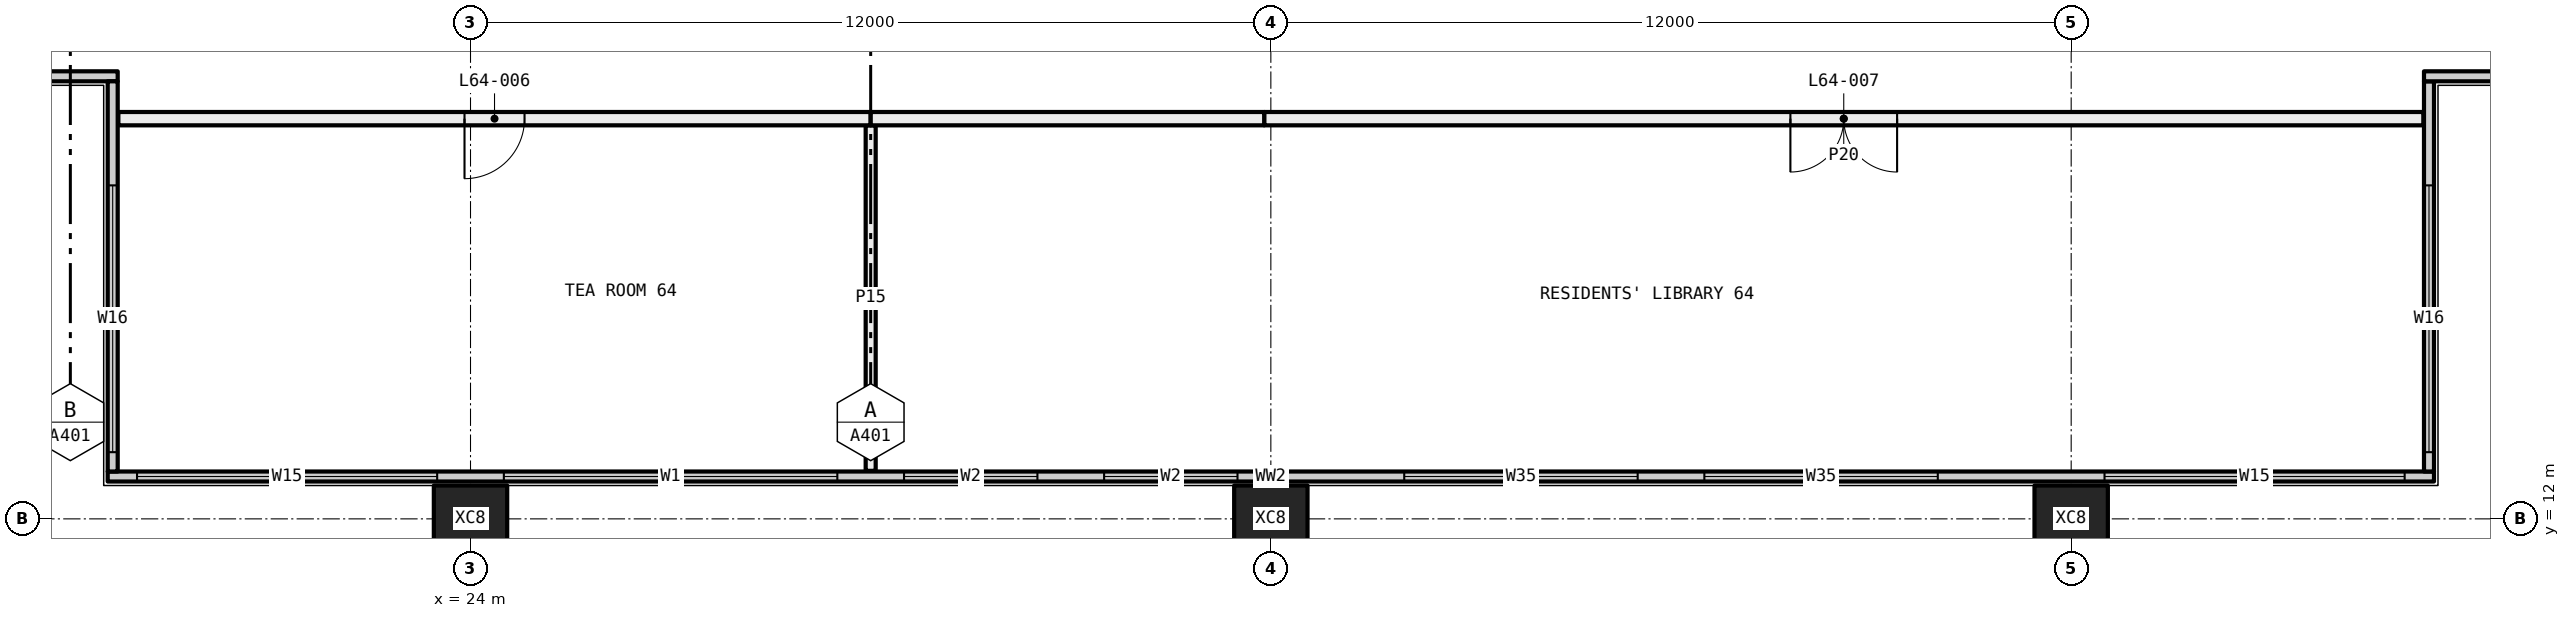
"""IFC4 building model, lengths in metres.
Left out: names, types, materials, properties, quantities, classifications, styles, units other than length and angle.
Written with IfcOpenShell. Run it as: python <this file> out.ifc"""

import sys

from ifc_helpers import new_model, si_unit, direction, frame, frame_2d, origin, origin_2d, place, context, subcontext, project, spatial, rectangle, hollow_rectangle, extrude, element, fill, save


model = new_model("IFC4")
c1 = context("Model", 3, precision=1e-05, world=origin(), true_north=direction((0.0, 1.0)))
c2 = subcontext(c1, "Body", "Model", "MODEL_VIEW")
j1 = project(units=[si_unit("LENGTHUNIT", "METRE"), si_unit("PLANEANGLEUNIT", "RADIAN")], contexts=[c1])
p1 = place(None, origin())
s1 = spatial("IfcSite", under=j1, at=p1, CompositionType="ELEMENT")
p2 = place(p1, origin())
s2 = spatial("IfcBuilding", under=s1, at=p2, CompositionType="ELEMENT")
p3 = place(p2, frame((0.0, 0.0, 238.65)))
s3 = spatial("IfcBuildingStorey", under=s2, at=p3, CompositionType="ELEMENT", Elevation=238.65)
for number, where, z_axis, x_axis in (
    (1, (24.0, 12.0, -0.4), (0.0, 0.0, 1.0), (1.0, 0.0, 0.0)),
    (2, (36.0, 12.0, -0.4), (0.0, 0.0, 1.0), (1.0, 0.0, 0.0)),
    (3, (48.0, 12.0, -0.4), (0.0, 0.0, 1.0), (1.0, 0.0, 0.0)),
):
    element("IfcColumn", number, at=place(p3, frame(where, z_axis=z_axis, x_axis=x_axis)), inside=s3, PredefinedType="COLUMN", context=c2, shape_type="SweptSolid", body=[
        extrude(hollow_rectangle(XDim=1.1, YDim=1.0, WallThickness=0.04, at=origin_2d()), origin(), (0.0, 0.0, 1.0), 3.45),
    ])
p4 = place(p3, frame((18.56, 12.635, 0.0), z_axis=(0.0, 0.0, 1.0), x_axis=(1.0, 0.0, 0.0)))
e4 = element("IfcWall", 4, at=p4, inside=s3, PredefinedType="ELEMENTEDWALL", context=c2, shape_type="SweptSolid", body=[
    extrude(rectangle(XDim=34.88, YDim=0.15, at=frame_2d((17.44, 0.0))), origin(), (0.0, 0.0, 1.0), 3.05),
])
p5 = place(p4, frame((0.44, 0.0, 0.45)))
e5 = element("IfcOpeningElement", 5, at=p5, cuts=e4, PredefinedType="OPENING", context=c2, shape_type="SweptSolid", body=[
    extrude(rectangle(XDim=4.5, YDim=2.55, at=frame_2d((2.25, 1.275))), frame((0.0, 0.085, 0.0), z_axis=(0.0, -1.0, 0.0), x_axis=(1.0, 0.0, 0.0)), (0.0, 0.0, 1.0), 0.17),
])
p6 = place(p4, frame((5.94, 0.0, 0.45)))
e6 = element("IfcOpeningElement", 6, at=p6, cuts=e4, PredefinedType="OPENING", context=c2, shape_type="SweptSolid", body=[
    extrude(rectangle(XDim=5.0, YDim=2.55, at=frame_2d((2.5, 1.275))), frame((0.0, 0.085, 0.0), z_axis=(0.0, -1.0, 0.0), x_axis=(1.0, 0.0, 0.0)), (0.0, 0.0, 1.0), 0.17),
])
p7 = place(p4, frame((11.94, 0.0, 0.45)))
e7 = element("IfcOpeningElement", 7, at=p7, cuts=e4, PredefinedType="OPENING", context=c2, shape_type="SweptSolid", body=[
    extrude(rectangle(XDim=2.0, YDim=2.55, at=frame_2d((1.0, 1.275))), frame((0.0, 0.085, 0.0), z_axis=(0.0, -1.0, 0.0), x_axis=(1.0, 0.0, 0.0)), (0.0, 0.0, 1.0), 0.17),
])
p8 = place(p4, frame((14.94, 0.0, 0.45)))
e8 = element("IfcOpeningElement", 8, at=p8, cuts=e4, PredefinedType="OPENING", context=c2, shape_type="SweptSolid", body=[
    extrude(rectangle(XDim=2.0, YDim=2.55, at=frame_2d((1.0, 1.275))), frame((0.0, 0.085, 0.0), z_axis=(0.0, -1.0, 0.0), x_axis=(1.0, 0.0, 0.0)), (0.0, 0.0, 1.0), 0.17),
])
p9 = place(p4, frame((19.44, 0.0, 0.45)))
e9 = element("IfcOpeningElement", 9, at=p9, cuts=e4, PredefinedType="OPENING", context=c2, shape_type="SweptSolid", body=[
    extrude(rectangle(XDim=3.5, YDim=2.55, at=frame_2d((1.75, 1.275))), frame((0.0, 0.085, 0.0), z_axis=(0.0, -1.0, 0.0), x_axis=(1.0, 0.0, 0.0)), (0.0, 0.0, 1.0), 0.17),
])
p10 = place(p4, frame((23.94, 0.0, 0.45)))
e10 = element("IfcOpeningElement", 10, at=p10, cuts=e4, PredefinedType="OPENING", context=c2, shape_type="SweptSolid", body=[
    extrude(rectangle(XDim=3.5, YDim=2.55, at=frame_2d((1.75, 1.275))), frame((0.0, 0.085, 0.0), z_axis=(0.0, -1.0, 0.0), x_axis=(1.0, 0.0, 0.0)), (0.0, 0.0, 1.0), 0.17),
])
p11 = place(p4, frame((29.94, 0.0, 0.45)))
e11 = element("IfcOpeningElement", 11, at=p11, cuts=e4, PredefinedType="OPENING", context=c2, shape_type="SweptSolid", body=[
    extrude(rectangle(XDim=4.5, YDim=2.55, at=frame_2d((2.25, 1.275))), frame((0.0, 0.085, 0.0), z_axis=(0.0, -1.0, 0.0), x_axis=(1.0, 0.0, 0.0)), (0.0, 0.0, 1.0), 0.17),
])
p12 = place(p3, frame((53.365, 12.71, 0.0), z_axis=(0.0, 0.0, 1.0), x_axis=(0.0, 1.0, 0.0)))
e12 = element("IfcWall", 12, at=p12, inside=s3, PredefinedType="ELEMENTEDWALL", context=c2, shape_type="SweptSolid", body=[
    extrude(rectangle(XDim=5.85, YDim=0.15, at=frame_2d((2.925, 0.0))), origin(), (0.0, 0.0, 1.0), 3.05),
])
p13 = place(p12, frame((0.29, 0.0, 0.45)))
e13 = element("IfcOpeningElement", 13, at=p13, cuts=e12, PredefinedType="OPENING", context=c2, shape_type="SweptSolid", body=[
    extrude(rectangle(XDim=4.0, YDim=2.55, at=frame_2d((2.0, 1.275))), frame((0.0, 0.085, 0.0), z_axis=(0.0, -1.0, 0.0), x_axis=(1.0, 0.0, 0.0)), (0.0, 0.0, 1.0), 0.17),
])
p14 = place(p3, frame((53.29, 18.635, 0.0), z_axis=(0.0, 0.0, 1.0), x_axis=(1.0, 0.0, 0.0)))
e14 = element("IfcWall", 14, at=p14, inside=s3, PredefinedType="ELEMENTEDWALL", context=c2, shape_type="SweptSolid", body=[
    extrude(rectangle(XDim=6.15, YDim=0.15, at=frame_2d((3.075, 0.0))), origin(), (0.0, 0.0, 1.0), 3.05),
])
p15 = place(p14, frame((1.71, 0.0, 0.45)))
e15 = element("IfcOpeningElement", 15, at=p15, cuts=e14, PredefinedType="OPENING", context=c2, shape_type="SweptSolid", body=[
    extrude(rectangle(XDim=4.0, YDim=2.55, at=frame_2d((2.0, 1.275))), frame((0.0, 0.085, 0.0), z_axis=(0.0, -1.0, 0.0), x_axis=(1.0, 0.0, 0.0)), (0.0, 0.0, 1.0), 0.17),
])
p16 = place(p3, frame((12.56, 18.635, 0.0), z_axis=(0.0, 0.0, 1.0), x_axis=(1.0, 0.0, 0.0)))
e16 = element("IfcWall", 16, at=p16, inside=s3, PredefinedType="ELEMENTEDWALL", context=c2, shape_type="SweptSolid", body=[
    extrude(rectangle(XDim=6.15, YDim=0.15, at=frame_2d((3.075, 0.0))), origin(), (0.0, 0.0, 1.0), 3.05),
])
p17 = place(p16, frame((0.44, 0.0, 0.45)))
e17 = element("IfcOpeningElement", 17, at=p17, cuts=e16, PredefinedType="OPENING", context=c2, shape_type="SweptSolid", body=[
    extrude(rectangle(XDim=4.0, YDim=2.55, at=frame_2d((2.0, 1.275))), frame((0.0, 0.085, 0.0), z_axis=(0.0, -1.0, 0.0), x_axis=(1.0, 0.0, 0.0)), (0.0, 0.0, 1.0), 0.17),
])
p18 = place(p3, frame((18.635, 12.71, 0.0), z_axis=(0.0, 0.0, 1.0), x_axis=(0.0, 1.0, 0.0)))
e18 = element("IfcWall", 18, at=p18, inside=s3, PredefinedType="ELEMENTEDWALL", context=c2, shape_type="SweptSolid", body=[
    extrude(rectangle(XDim=5.85, YDim=0.15, at=frame_2d((2.925, 0.0))), origin(), (0.0, 0.0, 1.0), 3.05),
])
p19 = place(p18, frame((0.29, 0.0, 0.45)))
e19 = element("IfcOpeningElement", 19, at=p19, cuts=e18, PredefinedType="OPENING", context=c2, shape_type="SweptSolid", body=[
    extrude(rectangle(XDim=4.0, YDim=2.55, at=frame_2d((2.0, 1.275))), frame((0.0, 0.085, 0.0), z_axis=(0.0, -1.0, 0.0), x_axis=(1.0, 0.0, 0.0)), (0.0, 0.0, 1.0), 0.17),
])
p20 = place(p3, frame((30.0, 12.72, 0.0), z_axis=(0.0, 0.0, 1.0), x_axis=(0.0, 1.0, 0.0)))
e20 = element("IfcWall", 20, at=p20, inside=s3, PredefinedType="PARTITIONING", context=c2, shape_type="SweptSolid", body=[
    extrude(rectangle(XDim=5.18, YDim=0.15, at=frame_2d((2.59, 0.0))), origin(), (0.0, 0.0, 1.0), 3.05),
])
p21 = place(p3, frame((30.0, 18.0, 0.0), z_axis=(0.0, 0.0, 1.0), x_axis=(-1.0, 0.0, 0.0)))
e21 = element("IfcWall", 21, at=p21, inside=s3, PredefinedType="PARTITIONING", context=c2, shape_type="SweptSolid", body=[
    extrude(rectangle(XDim=11.28, YDim=0.2, at=frame_2d((5.64, 0.0))), origin(), (0.0, 0.0, 1.0), 3.05),
])
p22 = place(p21, frame((5.19, 0.0, 0.0)))
e22 = element("IfcOpeningElement", 22, at=p22, cuts=e21, PredefinedType="OPENING", context=c2, shape_type="SweptSolid", body=[
    extrude(rectangle(XDim=0.9, YDim=2.1, at=frame_2d((0.45, 1.05))), frame((0.0, 0.11, 0.0), z_axis=(0.0, -1.0, 0.0), x_axis=(1.0, 0.0, 0.0)), (0.0, 0.0, 1.0), 0.22),
])
p23 = place(p3, frame((53.28, 18.0, 0.0), z_axis=(0.0, 0.0, 1.0), x_axis=(-1.0, 0.0, 0.0)))
e23 = element("IfcWall", 23, at=p23, inside=s3, PredefinedType="PARTITIONING", context=c2, shape_type="SweptSolid", body=[
    extrude(rectangle(XDim=17.38, YDim=0.2, at=frame_2d((8.69, 0.0))), origin(), (0.0, 0.0, 1.0), 2.45),
])
p24 = place(p23, frame((7.89, 0.0, 0.0)))
e24 = element("IfcOpeningElement", 24, at=p24, cuts=e23, PredefinedType="OPENING", context=c2, shape_type="SweptSolid", body=[
    extrude(rectangle(XDim=1.6, YDim=2.1, at=frame_2d((0.8, 1.05))), frame((0.0, 0.11, 0.0), z_axis=(0.0, -1.0, 0.0), x_axis=(1.0, 0.0, 0.0)), (0.0, 0.0, 1.0), 0.22),
])
p25 = place(p3, frame((35.9, 18.0, 0.0), z_axis=(0.0, 0.0, 1.0), x_axis=(-1.0, 0.0, 0.0)))
e25 = element("IfcWall", 25, at=p25, inside=s3, PredefinedType="PARTITIONING", context=c2, shape_type="SweptSolid", body=[
    extrude(rectangle(XDim=5.9, YDim=0.2, at=frame_2d((2.95, 0.0))), origin(), (0.0, 0.0, 1.0), 3.05),
])
p26 = place(p5, origin())
e26 = element("IfcWindow", 26, at=p26, inside=s3, PartitioningType="SINGLE_PANEL", PredefinedType="WINDOW", context=c2, shape_type="SweptSolid", body=[
    extrude(rectangle(XDim=4.5, YDim=2.55, at=frame_2d((2.25, 1.275))), frame((0.0, 0.03, 0.0), z_axis=(0.0, -1.0, 0.0), x_axis=(1.0, 0.0, 0.0)), (0.0, 0.0, 1.0), 0.06),
])
fill(e5, e26)
p27 = place(p6, origin())
e27 = element("IfcWindow", 27, at=p27, inside=s3, PartitioningType="SINGLE_PANEL", PredefinedType="WINDOW", context=c2, shape_type="SweptSolid", body=[
    extrude(rectangle(XDim=5.0, YDim=2.55, at=frame_2d((2.5, 1.275))), frame((0.0, 0.03, 0.0), z_axis=(0.0, -1.0, 0.0), x_axis=(1.0, 0.0, 0.0)), (0.0, 0.0, 1.0), 0.06),
])
fill(e6, e27)
p28 = place(p7, origin())
e28 = element("IfcWindow", 28, at=p28, inside=s3, PartitioningType="SINGLE_PANEL", PredefinedType="WINDOW", context=c2, shape_type="SweptSolid", body=[
    extrude(rectangle(XDim=2.0, YDim=2.55, at=frame_2d((1.0, 1.275))), frame((0.0, 0.03, 0.0), z_axis=(0.0, -1.0, 0.0), x_axis=(1.0, 0.0, 0.0)), (0.0, 0.0, 1.0), 0.06),
])
fill(e7, e28)
p29 = place(p8, origin())
e29 = element("IfcWindow", 29, at=p29, inside=s3, PartitioningType="SINGLE_PANEL", PredefinedType="WINDOW", context=c2, shape_type="SweptSolid", body=[
    extrude(rectangle(XDim=2.0, YDim=2.55, at=frame_2d((1.0, 1.275))), frame((0.0, 0.03, 0.0), z_axis=(0.0, -1.0, 0.0), x_axis=(1.0, 0.0, 0.0)), (0.0, 0.0, 1.0), 0.06),
])
fill(e8, e29)
p30 = place(p9, origin())
e30 = element("IfcWindow", 30, at=p30, inside=s3, PartitioningType="SINGLE_PANEL", PredefinedType="WINDOW", context=c2, shape_type="SweptSolid", body=[
    extrude(rectangle(XDim=3.5, YDim=2.55, at=frame_2d((1.75, 1.275))), frame((0.0, 0.03, 0.0), z_axis=(0.0, -1.0, 0.0), x_axis=(1.0, 0.0, 0.0)), (0.0, 0.0, 1.0), 0.06),
])
fill(e9, e30)
p31 = place(p10, origin())
e31 = element("IfcWindow", 31, at=p31, inside=s3, PartitioningType="SINGLE_PANEL", PredefinedType="WINDOW", context=c2, shape_type="SweptSolid", body=[
    extrude(rectangle(XDim=3.5, YDim=2.55, at=frame_2d((1.75, 1.275))), frame((0.0, 0.03, 0.0), z_axis=(0.0, -1.0, 0.0), x_axis=(1.0, 0.0, 0.0)), (0.0, 0.0, 1.0), 0.06),
])
fill(e10, e31)
p32 = place(p11, origin())
e32 = element("IfcWindow", 32, at=p32, inside=s3, PartitioningType="SINGLE_PANEL", PredefinedType="WINDOW", context=c2, shape_type="SweptSolid", body=[
    extrude(rectangle(XDim=4.5, YDim=2.55, at=frame_2d((2.25, 1.275))), frame((0.0, 0.03, 0.0), z_axis=(0.0, -1.0, 0.0), x_axis=(1.0, 0.0, 0.0)), (0.0, 0.0, 1.0), 0.06),
])
fill(e11, e32)
p33 = place(p13, origin())
e33 = element("IfcWindow", 33, at=p33, inside=s3, PartitioningType="SINGLE_PANEL", PredefinedType="WINDOW", context=c2, shape_type="SweptSolid", body=[
    extrude(rectangle(XDim=4.0, YDim=2.55, at=frame_2d((2.0, 1.275))), frame((0.0, 0.03, 0.0), z_axis=(0.0, -1.0, 0.0), x_axis=(1.0, 0.0, 0.0)), (0.0, 0.0, 1.0), 0.06),
])
fill(e13, e33)
p34 = place(p19, origin())
e34 = element("IfcWindow", 34, at=p34, inside=s3, PartitioningType="SINGLE_PANEL", PredefinedType="WINDOW", context=c2, shape_type="SweptSolid", body=[
    extrude(rectangle(XDim=4.0, YDim=2.55, at=frame_2d((2.0, 1.275))), frame((0.0, 0.03, 0.0), z_axis=(0.0, -1.0, 0.0), x_axis=(1.0, 0.0, 0.0)), (0.0, 0.0, 1.0), 0.06),
])
fill(e19, e34)
p35 = place(p22, origin())
e35 = element("IfcDoor", 35, at=p35, inside=s3, OperationType="SINGLE_SWING_LEFT", PredefinedType="DOOR", context=c2, shape_type="SweptSolid", body=[
    extrude(rectangle(XDim=0.9, YDim=2.1, at=frame_2d((0.45, 1.05))), frame((0.0, 0.025, 0.0), z_axis=(0.0, -1.0, 0.0), x_axis=(1.0, 0.0, 0.0)), (0.0, 0.0, 1.0), 0.05),
])
fill(e22, e35)
p36 = place(p24, origin())
e36 = element("IfcDoor", 36, at=p36, inside=s3, OperationType="DOUBLE_DOOR_SINGLE_SWING", PredefinedType="DOOR", context=c2, shape_type="SweptSolid", body=[
    extrude(rectangle(XDim=1.6, YDim=2.1, at=frame_2d((0.8, 1.05))), frame((0.0, 0.025, 0.0), z_axis=(0.0, -1.0, 0.0), x_axis=(1.0, 0.0, 0.0)), (0.0, 0.0, 1.0), 0.05),
])
fill(e24, e36)
save(model, sys.argv[1])
